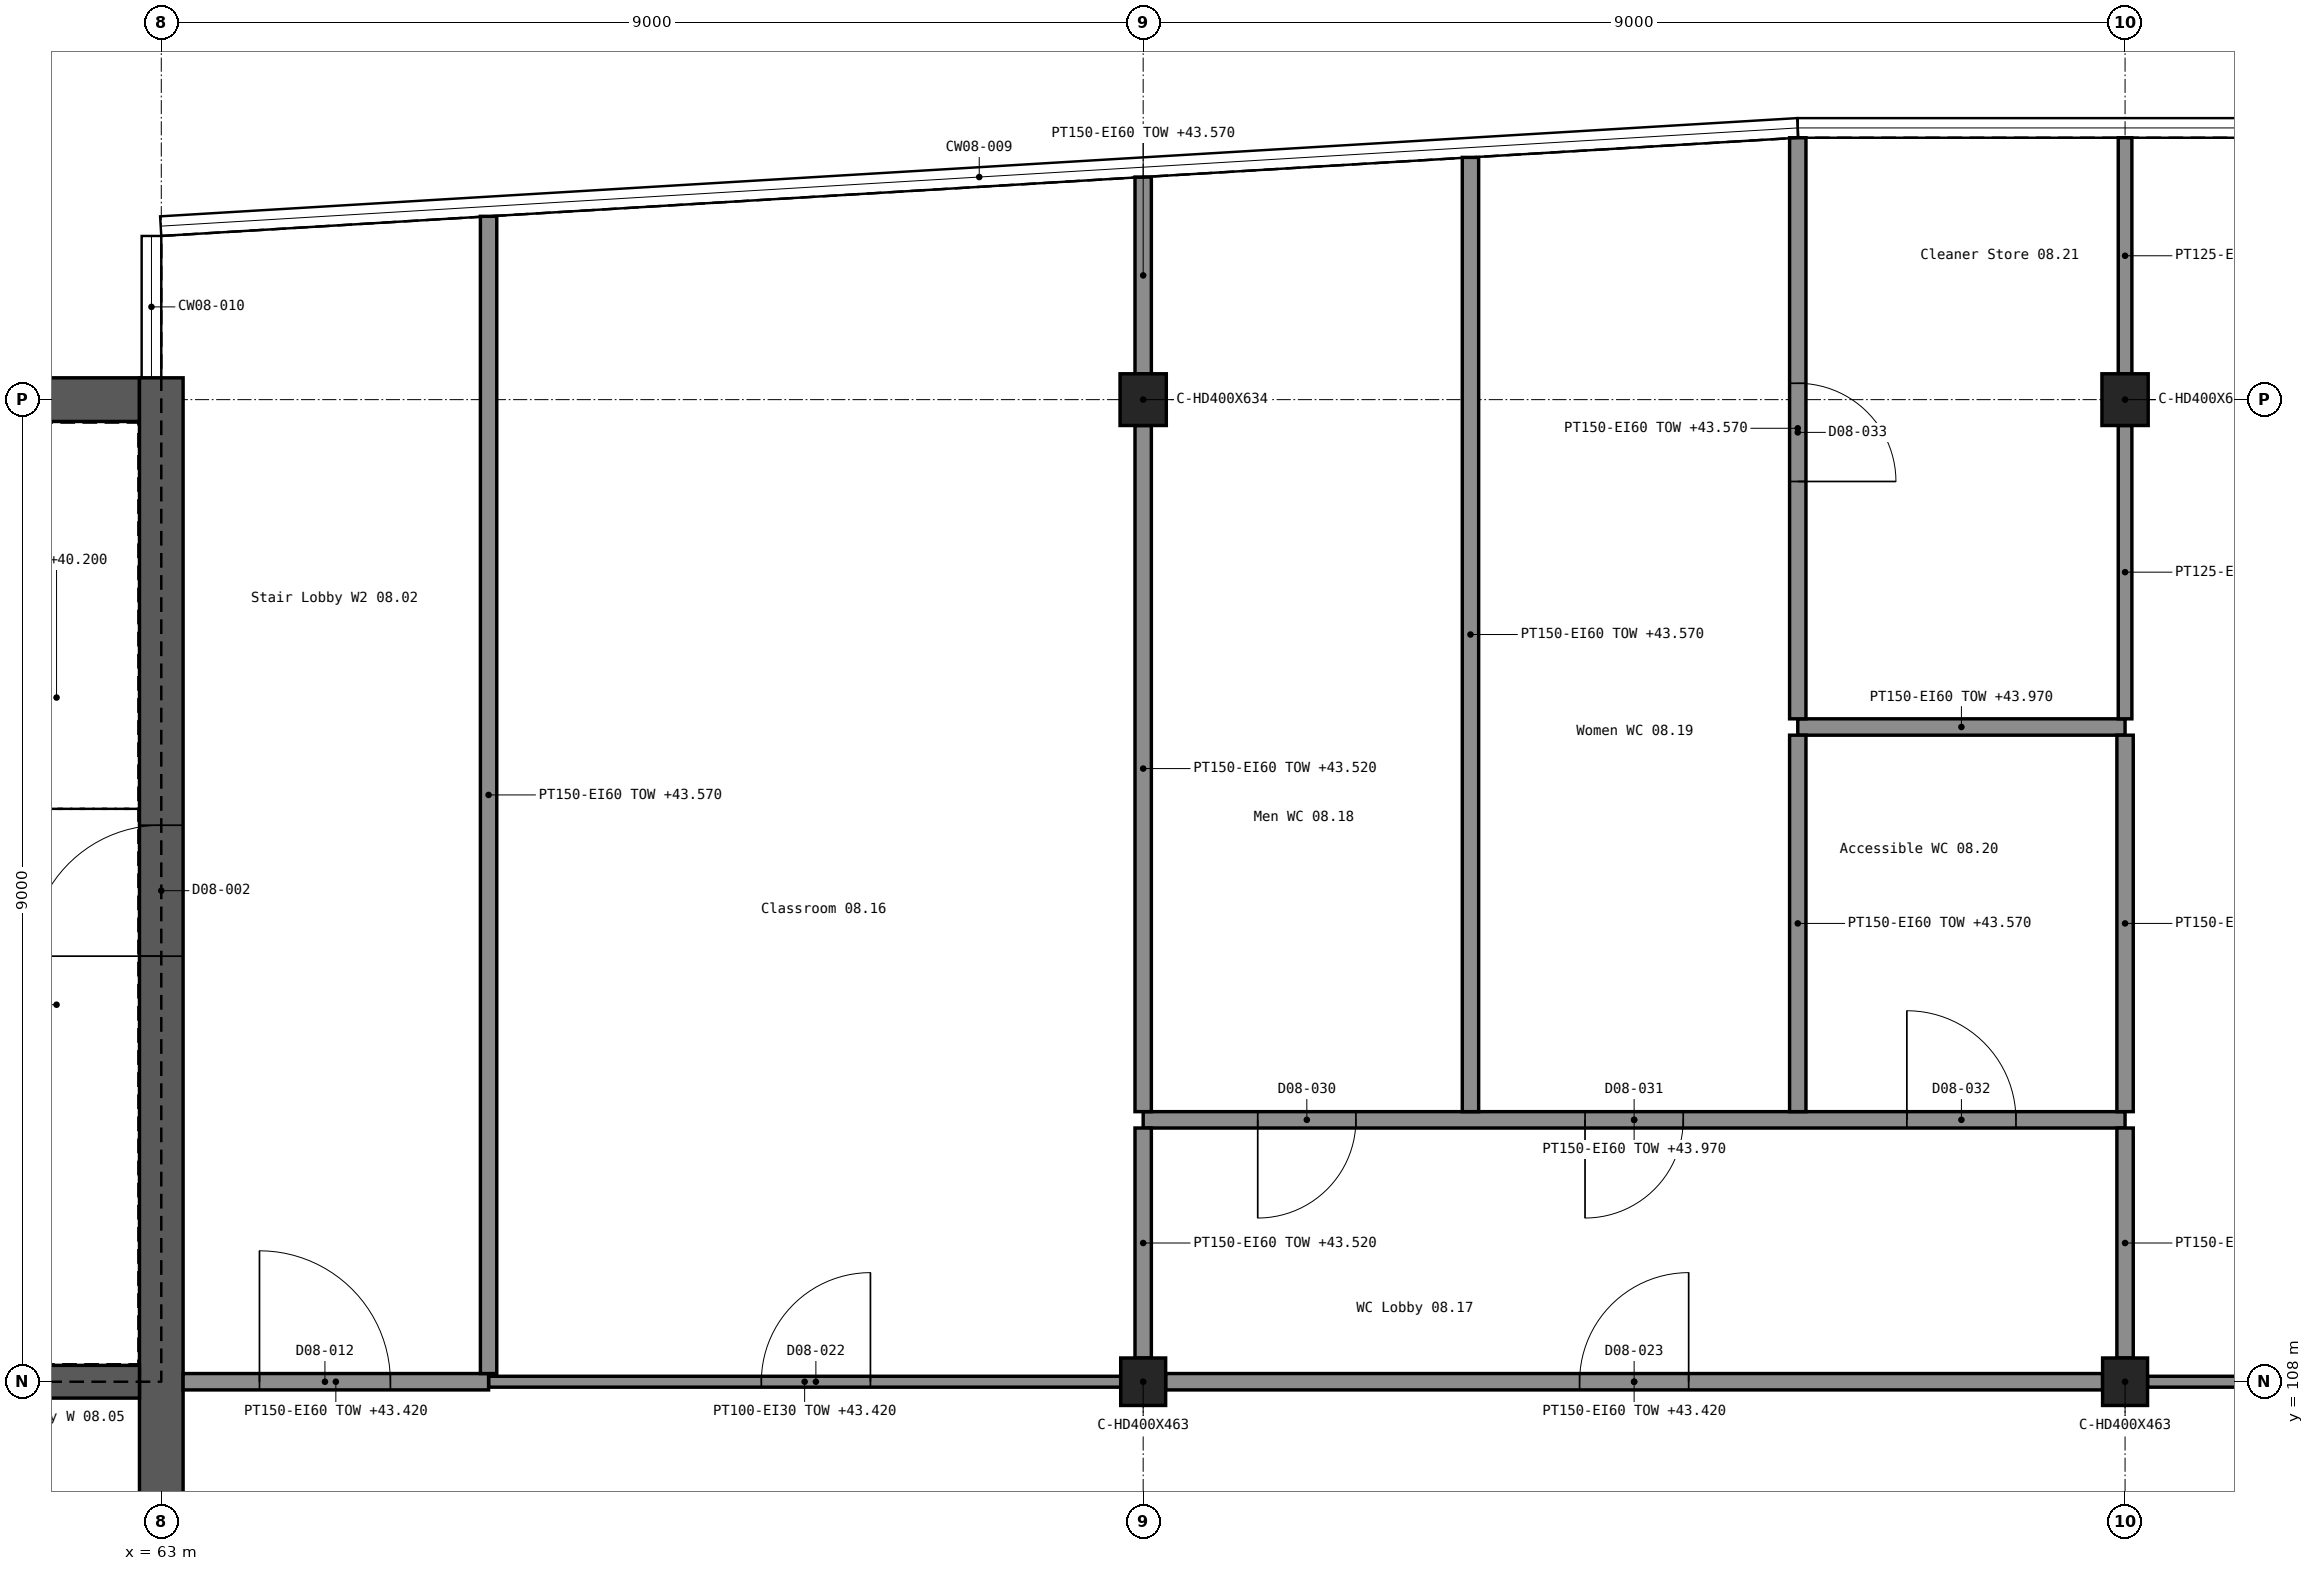
"""IFC4 building model, lengths in metres.
Left out: names, types, materials, properties, quantities, classifications, styles, units other than length and angle.
Written with IfcOpenShell. Run it as: python <this file> out.ifc"""

import sys

from ifc_helpers import new_model, si_unit, direction, frame, frame_2d, origin, origin_2d, place, context, subcontext, project, spatial, rectangle, i_section, extrude, element, fill, save


model = new_model("IFC4")
c1 = context("Model", 3, precision=1e-05, world=origin(), true_north=direction((0.0, 1.0)))
c2 = subcontext(c1, "Body", "Model", "MODEL_VIEW")
j1 = project(units=[si_unit("LENGTHUNIT", "METRE"), si_unit("PLANEANGLEUNIT", "RADIAN")], contexts=[c1])
p1 = place(None, origin())
s1 = spatial("IfcSite", under=j1, at=p1, CompositionType="ELEMENT")
p2 = place(p1, origin())
s2 = spatial("IfcBuilding", under=s1, at=p2, CompositionType="ELEMENT")
p3 = place(p2, frame((0.0, 0.0, 40.2)))
s3 = spatial("IfcBuildingStorey", under=s2, at=p3, CompositionType="ELEMENT", Elevation=40.2)
p4 = place(p3, frame((54.2, 117.0, 0.0), z_axis=(0.0, 0.0, 1.0), x_axis=(1.0, 0.0, 0.0)))
e1 = element("IfcWall", 1, at=p4, inside=s3, PredefinedType="SHEAR", context=c2, shape_type="SweptSolid", body=[
    extrude(rectangle(XDim=8.6, YDim=0.4, at=frame_2d((4.3, 0.0))), origin(), (0.0, 0.0, 1.0), 3.9),
])
p5 = place(p4, frame((4.05, 0.0, 1.2)))
e2 = element("IfcOpeningElement", 2, at=p5, cuts=e1, PredefinedType="OPENING", context=c2, shape_type="SweptSolid", body=[
    extrude(rectangle(XDim=0.9, YDim=1.5, at=frame_2d((0.45, 0.75))), frame((0.0, 0.211, 0.0), z_axis=(0.0, -1.0, 0.0), x_axis=(1.0, 0.0, 0.0)), (0.0, 0.0, 1.0), 0.422),
])
p6 = place(p3, frame((63.0, 89.8, 0.0), z_axis=(0.0, 0.0, 1.0), x_axis=(0.0, 1.0, 0.0)))
e3 = element("IfcWall", 3, at=p6, inside=s3, PredefinedType="SHEAR", context=c2, shape_type="SweptSolid", body=[
    extrude(rectangle(XDim=27.4, YDim=0.4, at=frame_2d((13.7, 0.0))), origin(), (0.0, 0.0, 1.0), 3.9),
])
p7 = place(p6, frame((4.1, 0.0, 0.0)))
e4 = element("IfcOpeningElement", 4, at=p7, cuts=e3, PredefinedType="OPENING", context=c2, shape_type="SweptSolid", body=[
    extrude(rectangle(XDim=1.2, YDim=2.1, at=frame_2d((0.6, 1.05))), frame((0.0, 0.211, 0.0), z_axis=(0.0, -1.0, 0.0), x_axis=(1.0, 0.0, 0.0)), (0.0, 0.0, 1.0), 0.422),
])
p8 = place(p6, frame((22.1, 0.0, 0.0)))
e5 = element("IfcOpeningElement", 5, at=p8, cuts=e3, PredefinedType="OPENING", context=c2, shape_type="SweptSolid", body=[
    extrude(rectangle(XDim=1.2, YDim=2.1, at=frame_2d((0.6, 1.05))), frame((0.0, 0.211, 0.0), z_axis=(0.0, -1.0, 0.0), x_axis=(1.0, 0.0, 0.0)), (0.0, 0.0, 1.0), 0.422),
])
p9 = place(p6, frame((12.5, 0.0, 0.0)))
e6 = element("IfcOpeningElement", 6, at=p9, cuts=e3, PredefinedType="OPENING", context=c2, shape_type="SweptSolid", body=[
    extrude(rectangle(XDim=2.0, YDim=2.1, at=frame_2d((1.0, 1.05))), frame((0.0, 0.211, 0.0), z_axis=(0.0, -1.0, 0.0), x_axis=(1.0, 0.0, 0.0)), (0.0, 0.0, 1.0), 0.422),
])
p10 = place(p3, frame((54.2, 108.0, 0.0), z_axis=(0.0, 0.0, 1.0), x_axis=(1.0, 0.0, 0.0)))
e7 = element("IfcWall", 7, at=p10, inside=s3, PredefinedType="SHEAR", context=c2, shape_type="SweptSolid", body=[
    extrude(rectangle(XDim=8.6, YDim=0.3, at=frame_2d((4.3, 0.0))), origin(), (0.0, 0.0, 1.0), 3.9),
])
for number, where, z_axis, x_axis in (
    (8, (72.0, 108.0, 0.0), (0.0, 0.0, 1.0), (1.0, 0.0, 0.0)),
    (9, (81.0, 108.0, 0.0), (0.0, 0.0, 1.0), (1.0, 0.0, 0.0)),
):
    element("IfcColumn", number, at=place(p3, frame(where, z_axis=z_axis, x_axis=x_axis)), inside=s3, PredefinedType="COLUMN", context=c2, shape_type="SweptSolid", body=[
        extrude(i_section(OverallWidth=0.412, OverallDepth=0.435, WebThickness=0.036, FlangeThickness=0.057, FilletRadius=0.015, at=origin_2d()), origin(), (0.0, 0.0, 1.0), 3.9),
    ])
for number, where, z_axis, x_axis in (
    (10, (72.0, 117.0, 0.0), (0.0, 0.0, 1.0), (1.0, 0.0, 0.0)),
    (11, (81.0, 117.0, 0.0), (0.0, 0.0, 1.0), (1.0, 0.0, 0.0)),
):
    element("IfcColumn", number, at=place(p3, frame(where, z_axis=z_axis, x_axis=x_axis)), inside=s3, PredefinedType="COLUMN", context=c2, shape_type="SweptSolid", body=[
        extrude(i_section(OverallWidth=0.424, OverallDepth=0.474, WebThickness=0.048, FlangeThickness=0.077, FilletRadius=0.015, at=origin_2d()), origin(), (0.0, 0.0, 1.0), 3.9),
    ])
p11 = place(p3, frame((66.0, 108.0, 0.0), z_axis=(0.0, 0.0, 1.0), x_axis=(1.0, 0.0, 0.0)))
e12 = element("IfcWall", 12, at=p11, inside=s3, PredefinedType="PARTITIONING", context=c2, shape_type="SweptSolid", body=[
    extrude(rectangle(XDim=5.794, YDim=0.1, at=frame_2d((2.897, 0.0))), origin(), (0.0, 0.0, 1.0), 3.22),
])
p12 = place(p11, frame((2.5, 0.0, 0.0)))
e13 = element("IfcOpeningElement", 13, at=p12, cuts=e12, PredefinedType="OPENING", context=c2, shape_type="SweptSolid", body=[
    extrude(rectangle(XDim=1.0, YDim=2.1, at=frame_2d((0.5, 1.05))), frame((0.0, 0.061, 0.0), z_axis=(0.0, -1.0, 0.0), x_axis=(1.0, 0.0, 0.0)), (0.0, 0.0, 1.0), 0.122),
])
p13 = place(p3, frame((81.206, 108.0, 0.0), z_axis=(0.0, 0.0, 1.0), x_axis=(1.0, 0.0, 0.0)))
e14 = element("IfcWall", 14, at=p13, inside=s3, PredefinedType="PARTITIONING", context=c2, shape_type="SweptSolid", body=[
    extrude(rectangle(XDim=8.588, YDim=0.1, at=frame_2d((4.294, 0.0))), origin(), (0.0, 0.0, 1.0), 3.22),
])
p14 = place(p13, frame((1.419, 0.0, 0.0)))
e15 = element("IfcOpeningElement", 15, at=p14, cuts=e14, PredefinedType="OPENING", context=c2, shape_type="SweptSolid", body=[
    extrude(rectangle(XDim=1.0, YDim=2.1, at=frame_2d((0.5, 1.05))), frame((0.0, 0.061, 0.0), z_axis=(0.0, -1.0, 0.0), x_axis=(1.0, 0.0, 0.0)), (0.0, 0.0, 1.0), 0.122),
])
p15 = place(p3, frame((63.2, 108.0, 0.0), z_axis=(0.0, 0.0, 1.0), x_axis=(1.0, 0.0, 0.0)))
e16 = element("IfcWall", 16, at=p15, inside=s3, PredefinedType="PARTITIONING", context=c2, shape_type="SweptSolid", body=[
    extrude(rectangle(XDim=2.8, YDim=0.15, at=frame_2d((1.4, 0.0))), origin(), (0.0, 0.0, 1.0), 3.22),
])
p16 = place(p15, frame((0.7, 0.0, 0.0)))
e17 = element("IfcOpeningElement", 17, at=p16, cuts=e16, PredefinedType="OPENING", context=c2, shape_type="SweptSolid", body=[
    extrude(rectangle(XDim=1.2, YDim=2.1, at=frame_2d((0.6, 1.05))), frame((0.0, 0.086, 0.0), z_axis=(0.0, -1.0, 0.0), x_axis=(1.0, 0.0, 0.0)), (0.0, 0.0, 1.0), 0.172),
])
p17 = place(p3, frame((72.206, 108.0, 0.0), z_axis=(0.0, 0.0, 1.0), x_axis=(1.0, 0.0, 0.0)))
e18 = element("IfcWall", 18, at=p17, inside=s3, PredefinedType="PARTITIONING", context=c2, shape_type="SweptSolid", body=[
    extrude(rectangle(XDim=8.588, YDim=0.15, at=frame_2d((4.294, 0.0))), origin(), (0.0, 0.0, 1.0), 3.22),
])
p18 = place(p17, frame((3.794, 0.0, 0.0)))
e19 = element("IfcOpeningElement", 19, at=p18, cuts=e18, PredefinedType="OPENING", context=c2, shape_type="SweptSolid", body=[
    extrude(rectangle(XDim=1.0, YDim=2.1, at=frame_2d((0.5, 1.05))), frame((0.0, 0.086, 0.0), z_axis=(0.0, -1.0, 0.0), x_axis=(1.0, 0.0, 0.0)), (0.0, 0.0, 1.0), 0.172),
])
p19 = place(p3, frame((72.0, 110.4, 0.0), z_axis=(0.0, 0.0, 1.0), x_axis=(1.0, 0.0, 0.0)))
e20 = element("IfcWall", 20, at=p19, inside=s3, PredefinedType="PARTITIONING", context=c2, shape_type="SweptSolid", body=[
    extrude(rectangle(XDim=9.0, YDim=0.15, at=frame_2d((4.5, 0.0))), origin(), (0.0, 0.0, 1.0), 3.77),
])
p20 = place(p19, frame((1.05, 0.0, 0.0)))
e21 = element("IfcOpeningElement", 21, at=p20, cuts=e20, PredefinedType="OPENING", context=c2, shape_type="SweptSolid", body=[
    extrude(rectangle(XDim=0.9, YDim=2.1, at=frame_2d((0.45, 1.05))), frame((0.0, 0.086, 0.0), z_axis=(0.0, -1.0, 0.0), x_axis=(1.0, 0.0, 0.0)), (0.0, 0.0, 1.0), 0.172),
])
p21 = place(p19, frame((4.05, 0.0, 0.0)))
e22 = element("IfcOpeningElement", 22, at=p21, cuts=e20, PredefinedType="OPENING", context=c2, shape_type="SweptSolid", body=[
    extrude(rectangle(XDim=0.9, YDim=2.1, at=frame_2d((0.45, 1.05))), frame((0.0, 0.086, 0.0), z_axis=(0.0, -1.0, 0.0), x_axis=(1.0, 0.0, 0.0)), (0.0, 0.0, 1.0), 0.172),
])
p22 = place(p19, frame((7.0, 0.0, 0.0)))
e23 = element("IfcOpeningElement", 23, at=p22, cuts=e20, PredefinedType="OPENING", context=c2, shape_type="SweptSolid", body=[
    extrude(rectangle(XDim=1.0, YDim=2.1, at=frame_2d((0.5, 1.05))), frame((0.0, 0.086, 0.0), z_axis=(0.0, -1.0, 0.0), x_axis=(1.0, 0.0, 0.0)), (0.0, 0.0, 1.0), 0.172),
])
p23 = place(p3, frame((78.0, 114.0, 0.0), z_axis=(0.0, 0.0, 1.0), x_axis=(1.0, 0.0, 0.0)))
e24 = element("IfcWall", 24, at=p23, inside=s3, PredefinedType="PARTITIONING", context=c2, shape_type="SweptSolid", body=[
    extrude(rectangle(XDim=3.0, YDim=0.15, at=frame_2d((1.5, 0.0))), origin(), (0.0, 0.0, 1.0), 3.77),
])
p24 = place(p3, frame((66.0, 108.075, 0.0), z_axis=(0.0, 0.0, 1.0), x_axis=(0.0, 1.0, 0.0)))
e25 = element("IfcWall", 25, at=p24, inside=s3, PredefinedType="PARTITIONING", context=c2, shape_type="SweptSolid", body=[
    extrude(rectangle(XDim=10.605, YDim=0.15, at=frame_2d((5.302, 0.0))), origin(), (0.0, 0.0, 1.0), 3.37),
])
p25 = place(p3, frame((72.0, 108.218, 0.0), z_axis=(0.0, 0.0, 1.0), x_axis=(0.0, 1.0, 0.0)))
e26 = element("IfcWall", 26, at=p25, inside=s3, PredefinedType="PARTITIONING", context=c2, shape_type="SweptSolid", body=[
    extrude(rectangle(XDim=2.107, YDim=0.15, at=frame_2d((1.054, 0.0))), origin(), (0.0, 0.0, 1.0), 3.32),
])
p26 = place(p3, frame((72.0, 110.475, 0.0), z_axis=(0.0, 0.0, 1.0), x_axis=(0.0, 1.0, 0.0)))
e27 = element("IfcWall", 27, at=p26, inside=s3, PredefinedType="PARTITIONING", context=c2, shape_type="SweptSolid", body=[
    extrude(rectangle(XDim=6.288, YDim=0.15, at=frame_2d((3.144, 0.0))), origin(), (0.0, 0.0, 1.0), 3.32),
])
p27 = place(p3, frame((72.0, 117.237, 0.0), z_axis=(0.0, 0.0, 1.0), x_axis=(0.0, 1.0, 0.0)))
e28 = element("IfcWall", 28, at=p27, inside=s3, PredefinedType="PARTITIONING", context=c2, shape_type="SweptSolid", body=[
    extrude(rectangle(XDim=1.803, YDim=0.15, at=frame_2d((0.901, 0.0))), origin(), (0.0, 0.0, 1.0), 3.37),
])
p28 = place(p3, frame((75.0, 110.475, 0.0), z_axis=(0.0, 0.0, 1.0), x_axis=(0.0, 1.0, 0.0)))
e29 = element("IfcWall", 29, at=p28, inside=s3, PredefinedType="PARTITIONING", context=c2, shape_type="SweptSolid", body=[
    extrude(rectangle(XDim=8.745, YDim=0.15, at=frame_2d((4.373, 0.0))), origin(), (0.0, 0.0, 1.0), 3.37),
])
p29 = place(p3, frame((78.0, 110.475, 0.0), z_axis=(0.0, 0.0, 1.0), x_axis=(0.0, 1.0, 0.0)))
e30 = element("IfcWall", 30, at=p29, inside=s3, PredefinedType="PARTITIONING", context=c2, shape_type="SweptSolid", body=[
    extrude(rectangle(XDim=3.45, YDim=0.15, at=frame_2d((1.725, 0.0))), origin(), (0.0, 0.0, 1.0), 3.37),
])
p30 = place(p3, frame((78.0, 114.075, 0.0), z_axis=(0.0, 0.0, 1.0), x_axis=(0.0, 1.0, 0.0)))
e31 = element("IfcWall", 31, at=p30, inside=s3, PredefinedType="PARTITIONING", context=c2, shape_type="SweptSolid", body=[
    extrude(rectangle(XDim=5.325, YDim=0.15, at=frame_2d((2.663, 0.0))), origin(), (0.0, 0.0, 1.0), 3.37),
])
p31 = place(p30, frame((2.175, 0.0, 0.0)))
e32 = element("IfcOpeningElement", 32, at=p31, cuts=e31, PredefinedType="OPENING", context=c2, shape_type="SweptSolid", body=[
    extrude(rectangle(XDim=0.9, YDim=2.1, at=frame_2d((0.45, 1.05))), frame((0.0, 0.086, 0.0), z_axis=(0.0, -1.0, 0.0), x_axis=(1.0, 0.0, 0.0)), (0.0, 0.0, 1.0), 0.172),
])
p32 = place(p3, frame((81.0, 114.075, 0.0), z_axis=(0.0, 0.0, 1.0), x_axis=(0.0, 1.0, 0.0)))
e33 = element("IfcWall", 33, at=p32, inside=s3, PredefinedType="PARTITIONING", context=c2, shape_type="SweptSolid", body=[
    extrude(rectangle(XDim=2.688, YDim=0.125, at=frame_2d((1.344, 0.0))), origin(), (0.0, 0.0, 1.0), 3.32),
])
p33 = place(p3, frame((81.0, 117.237, 0.0), z_axis=(0.0, 0.0, 1.0), x_axis=(0.0, 1.0, 0.0)))
e34 = element("IfcWall", 34, at=p33, inside=s3, PredefinedType="PARTITIONING", context=c2, shape_type="SweptSolid", body=[
    extrude(rectangle(XDim=2.163, YDim=0.125, at=frame_2d((1.082, 0.0))), origin(), (0.0, 0.0, 1.0), 3.37),
])
p34 = place(p3, frame((81.0, 108.218, 0.0), z_axis=(0.0, 0.0, 1.0), x_axis=(0.0, 1.0, 0.0)))
e35 = element("IfcWall", 35, at=p34, inside=s3, PredefinedType="PARTITIONING", context=c2, shape_type="SweptSolid", body=[
    extrude(rectangle(XDim=2.107, YDim=0.15, at=frame_2d((1.054, 0.0))), origin(), (0.0, 0.0, 1.0), 3.32),
])
p35 = place(p3, frame((81.0, 110.475, 0.0), z_axis=(0.0, 0.0, 1.0), x_axis=(0.0, 1.0, 0.0)))
e36 = element("IfcWall", 36, at=p35, inside=s3, PredefinedType="PARTITIONING", context=c2, shape_type="SweptSolid", body=[
    extrude(rectangle(XDim=3.45, YDim=0.15, at=frame_2d((1.725, 0.0))), origin(), (0.0, 0.0, 1.0), 3.32),
])
p36 = place(p8, origin())
e37 = element("IfcDoor", 37, at=p36, inside=s3, OperationType="SINGLE_SWING_LEFT", PredefinedType="DOOR", context=c2, shape_type="SweptSolid", body=[
    extrude(rectangle(XDim=1.2, YDim=2.1, at=frame_2d((0.6, 1.05))), frame((0.0, 0.025, 0.0), z_axis=(0.0, -1.0, 0.0), x_axis=(1.0, 0.0, 0.0)), (0.0, 0.0, 1.0), 0.05),
])
fill(e5, e37)
p37 = place(p16, origin())
e38 = element("IfcDoor", 38, at=p37, inside=s3, OperationType="SINGLE_SWING_LEFT", PredefinedType="DOOR", context=c2, shape_type="SweptSolid", body=[
    extrude(rectangle(XDim=1.2, YDim=2.1, at=frame_2d((0.6, 1.05))), frame((0.0, 0.025, 0.0), z_axis=(0.0, -1.0, 0.0), x_axis=(1.0, 0.0, 0.0)), (0.0, 0.0, 1.0), 0.05),
])
fill(e17, e38)
p38 = place(p12, origin())
e39 = element("IfcDoor", 39, at=p38, inside=s3, OperationType="SINGLE_SWING_RIGHT", PredefinedType="DOOR", context=c2, shape_type="SweptSolid", body=[
    extrude(rectangle(XDim=1.0, YDim=2.1, at=frame_2d((0.5, 1.05))), frame((0.0, 0.025, 0.0), z_axis=(0.0, -1.0, 0.0), x_axis=(1.0, 0.0, 0.0)), (0.0, 0.0, 1.0), 0.05),
])
fill(e13, e39)
p39 = place(p18, origin())
e40 = element("IfcDoor", 40, at=p39, inside=s3, OperationType="SINGLE_SWING_RIGHT", PredefinedType="DOOR", context=c2, shape_type="SweptSolid", body=[
    extrude(rectangle(XDim=1.0, YDim=2.1, at=frame_2d((0.5, 1.05))), frame((0.0, 0.025, 0.0), z_axis=(0.0, -1.0, 0.0), x_axis=(1.0, 0.0, 0.0)), (0.0, 0.0, 1.0), 0.05),
])
fill(e19, e40)
p40 = place(p20, frame((0.9, 0.0, 0.0), z_axis=(0.0, 0.0, 1.0), x_axis=(-1.0, 0.0, 0.0)))
e41 = element("IfcDoor", 41, at=p40, inside=s3, OperationType="SINGLE_SWING_RIGHT", PredefinedType="DOOR", context=c2, shape_type="SweptSolid", body=[
    extrude(rectangle(XDim=0.9, YDim=2.1, at=frame_2d((0.45, 1.05))), frame((0.0, 0.025, 0.0), z_axis=(0.0, -1.0, 0.0), x_axis=(1.0, 0.0, 0.0)), (0.0, 0.0, 1.0), 0.05),
])
fill(e21, e41)
p41 = place(p21, frame((0.9, 0.0, 0.0), z_axis=(0.0, 0.0, 1.0), x_axis=(-1.0, 0.0, 0.0)))
e42 = element("IfcDoor", 42, at=p41, inside=s3, OperationType="SINGLE_SWING_RIGHT", PredefinedType="DOOR", context=c2, shape_type="SweptSolid", body=[
    extrude(rectangle(XDim=0.9, YDim=2.1, at=frame_2d((0.45, 1.05))), frame((0.0, 0.025, 0.0), z_axis=(0.0, -1.0, 0.0), x_axis=(1.0, 0.0, 0.0)), (0.0, 0.0, 1.0), 0.05),
])
fill(e22, e42)
p42 = place(p22, origin())
e43 = element("IfcDoor", 43, at=p42, inside=s3, OperationType="SINGLE_SWING_LEFT", PredefinedType="DOOR", context=c2, shape_type="SweptSolid", body=[
    extrude(rectangle(XDim=1.0, YDim=2.1, at=frame_2d((0.5, 1.05))), frame((0.0, 0.025, 0.0), z_axis=(0.0, -1.0, 0.0), x_axis=(1.0, 0.0, 0.0)), (0.0, 0.0, 1.0), 0.05),
])
fill(e23, e43)
p43 = place(p31, frame((0.9, 0.0, 0.0), z_axis=(0.0, 0.0, 1.0), x_axis=(-1.0, 0.0, 0.0)))
e44 = element("IfcDoor", 44, at=p43, inside=s3, OperationType="SINGLE_SWING_RIGHT", PredefinedType="DOOR", context=c2, shape_type="SweptSolid", body=[
    extrude(rectangle(XDim=0.9, YDim=2.1, at=frame_2d((0.45, 1.05))), frame((0.0, 0.025, 0.0), z_axis=(0.0, -1.0, 0.0), x_axis=(1.0, 0.0, 0.0)), (0.0, 0.0, 1.0), 0.05),
])
fill(e32, e44)
save(model, sys.argv[1])
